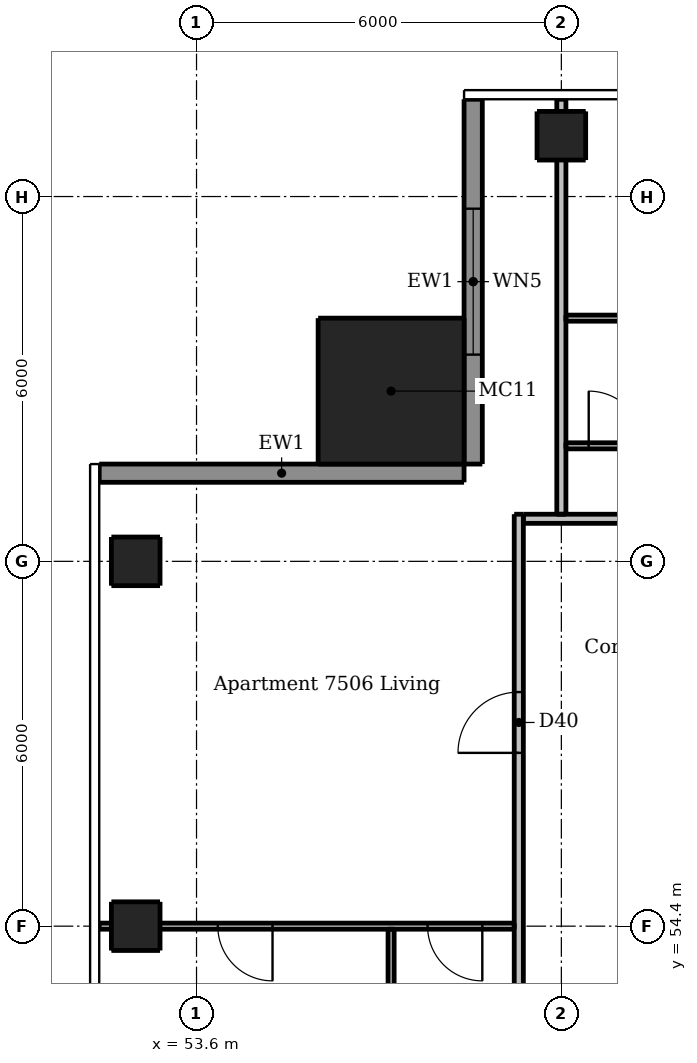
"""IFC4 building model, lengths in metres.
Left out: names, types, materials, properties, quantities, classifications, styles, units other than length and angle.
Written with IfcOpenShell. Run it as: python <this file> out.ifc"""

import sys

from ifc_helpers import new_model, si_unit, direction, frame, frame_2d, origin, origin_2d, place, context, subcontext, project, spatial, rectangle, extrude, element, fill, save


model = new_model("IFC4")
c1 = context("Model", 3, precision=1e-05, world=origin(), true_north=direction((0.0, 1.0)))
c2 = subcontext(c1, "Body", "Model", "MODEL_VIEW")
j1 = project(units=[si_unit("LENGTHUNIT", "METRE"), si_unit("PLANEANGLEUNIT", "RADIAN")], contexts=[c1])
p1 = place(None, origin())
s1 = spatial("IfcSite", under=j1, at=p1, CompositionType="ELEMENT")
p2 = place(p1, origin())
s2 = spatial("IfcBuilding", under=s1, at=p2, CompositionType="ELEMENT")
p3 = place(p2, frame((0.0, 0.0, 278.5)))
s3 = spatial("IfcBuildingStorey", under=s2, at=p3, CompositionType="ELEMENT", Elevation=278.5)
for number, where, z_axis, x_axis in (
    (1, (59.6, 67.4, 0.0), (0.0, 0.0, 1.0), (1.0, 0.0, 0.0)),
    (2, (52.6, 54.4, 0.0), (0.0, 0.0, 1.0), (1.0, 0.0, 0.0)),
    (3, (52.6, 60.4, 0.0), (0.0, 0.0, 1.0), (1.0, 0.0, 0.0)),
):
    element("IfcColumn", number, at=place(p3, frame(where, z_axis=z_axis, x_axis=x_axis)), inside=s3, PredefinedType="COLUMN", context=c2, shape_type="SweptSolid", body=[
        extrude(rectangle(XDim=0.8, YDim=0.8, at=origin_2d()), origin(), (0.0, 0.0, 1.0), 3.0),
    ])
p4 = place(p3, frame((56.8, 63.2, 0.0), z_axis=(0.0, 0.0, 1.0), x_axis=(1.0, 0.0, 0.0)))
e4 = element("IfcColumn", 4, at=p4, inside=s3, PredefinedType="COLUMN", context=c2, shape_type="SweptSolid", body=[
    extrude(rectangle(XDim=2.4, YDim=2.4, at=origin_2d()), origin(), (0.0, 0.0, 1.0), 3.3),
])
p5 = place(p3, frame((58.15, 68.0, 0.0), z_axis=(0.0, 0.0, 1.0), x_axis=(0.0, -1.0, 0.0)))
e5 = element("IfcWall", 5, at=p5, inside=s3, PredefinedType="SOLIDWALL", context=c2, shape_type="SweptSolid", body=[
    extrude(rectangle(XDim=6.0, YDim=0.3, at=frame_2d((3.0, 0.0))), origin(), (0.0, 0.0, 1.0), 3.0),
])
p6 = place(p5, frame((1.8, 0.0, 0.15)))
e6 = element("IfcOpeningElement", 6, at=p6, cuts=e5, PredefinedType="OPENING", context=c2, shape_type="SweptSolid", body=[
    extrude(rectangle(XDim=2.4, YDim=2.1, at=frame_2d((1.2, 1.05))), frame((0.0, 0.16, 0.0), z_axis=(0.0, -1.0, 0.0), x_axis=(1.0, 0.0, 0.0)), (0.0, 0.0, 1.0), 0.32),
])
p7 = place(p3, frame((58.0, 61.85, 0.0), z_axis=(0.0, 0.0, 1.0), x_axis=(-1.0, 0.0, 0.0)))
e7 = element("IfcWall", 7, at=p7, inside=s3, PredefinedType="SOLIDWALL", context=c2, shape_type="SweptSolid", body=[
    extrude(rectangle(XDim=6.0, YDim=0.3, at=frame_2d((3.0, 0.0))), origin(), (0.0, 0.0, 1.0), 3.0),
])
p8 = place(p3, frame((56.8, 54.35, 0.0), z_axis=(0.0, 0.0, 1.0), x_axis=(0.0, -1.0, 0.0)))
e8 = element("IfcWall", 8, at=p8, inside=s3, PredefinedType="PARTITIONING", context=c2, shape_type="SweptSolid", body=[
    extrude(rectangle(XDim=5.875, YDim=0.1, at=frame_2d((2.938, 0.0))), origin(), (0.0, 0.0, 1.0), 3.0),
])
p9 = place(p8, frame((3.75, 0.0, 0.0)))
e9 = element("IfcOpeningElement", 9, at=p9, cuts=e8, PredefinedType="OPENING", context=c2, shape_type="SweptSolid", body=[
    extrude(rectangle(XDim=0.8, YDim=2.1, at=frame_2d((0.4, 1.05))), frame((0.0, 0.06, 0.0), z_axis=(0.0, -1.0, 0.0), x_axis=(1.0, 0.0, 0.0)), (0.0, 0.0, 1.0), 0.12),
])
p10 = place(p3, frame((59.675, 64.4, 0.0), z_axis=(0.0, 0.0, 1.0), x_axis=(1.0, 0.0, 0.0)))
e10 = element("IfcWall", 10, at=p10, inside=s3, PredefinedType="PARTITIONING", context=c2, shape_type="SweptSolid", body=[
    extrude(rectangle(XDim=3.475, YDim=0.1, at=frame_2d((1.737, 0.0))), origin(), (0.0, 0.0, 1.0), 3.0),
])
p11 = place(p3, frame((59.675, 62.3, 0.0), z_axis=(0.0, 0.0, 1.0), x_axis=(1.0, 0.0, 0.0)))
e11 = element("IfcWall", 11, at=p11, inside=s3, PredefinedType="PARTITIONING", context=c2, shape_type="SweptSolid", body=[
    extrude(rectangle(XDim=17.85, YDim=0.1, at=frame_2d((8.925, 0.0))), origin(), (0.0, 0.0, 1.0), 3.0),
])
p12 = place(p11, frame((5.775, 0.0, 0.0)))
e12 = element("IfcOpeningElement", 12, at=p12, cuts=e11, PredefinedType="OPENING", context=c2, shape_type="SweptSolid", body=[
    extrude(rectangle(XDim=0.9, YDim=2.1, at=frame_2d((0.45, 1.05))), frame((0.0, 0.06, 0.0), z_axis=(0.0, -1.0, 0.0), x_axis=(1.0, 0.0, 0.0)), (0.0, 0.0, 1.0), 0.12),
])
p13 = place(p11, frame((9.975, 0.0, 0.0)))
e13 = element("IfcOpeningElement", 13, at=p13, cuts=e11, PredefinedType="OPENING", context=c2, shape_type="SweptSolid", body=[
    extrude(rectangle(XDim=0.9, YDim=2.1, at=frame_2d((0.45, 1.05))), frame((0.0, 0.06, 0.0), z_axis=(0.0, -1.0, 0.0), x_axis=(1.0, 0.0, 0.0)), (0.0, 0.0, 1.0), 0.12),
])
p14 = place(p11, frame((0.375, 0.0, 0.0)))
e14 = element("IfcOpeningElement", 14, at=p14, cuts=e11, PredefinedType="OPENING", context=c2, shape_type="SweptSolid", body=[
    extrude(rectangle(XDim=0.9, YDim=2.1, at=frame_2d((0.45, 1.05))), frame((0.0, 0.06, 0.0), z_axis=(0.0, -1.0, 0.0), x_axis=(1.0, 0.0, 0.0)), (0.0, 0.0, 1.0), 0.12),
])
p15 = place(p11, frame((2.225, 0.0, 0.0)))
e15 = element("IfcOpeningElement", 15, at=p15, cuts=e11, PredefinedType="OPENING", context=c2, shape_type="SweptSolid", body=[
    extrude(rectangle(XDim=0.8, YDim=2.1, at=frame_2d((0.4, 1.05))), frame((0.0, 0.06, 0.0), z_axis=(0.0, -1.0, 0.0), x_axis=(1.0, 0.0, 0.0)), (0.0, 0.0, 1.0), 0.12),
])
p16 = place(p11, frame((15.675, 0.0, 0.0)))
e16 = element("IfcOpeningElement", 16, at=p16, cuts=e11, PredefinedType="OPENING", context=c2, shape_type="SweptSolid", body=[
    extrude(rectangle(XDim=0.9, YDim=2.1, at=frame_2d((0.45, 1.05))), frame((0.0, 0.06, 0.0), z_axis=(0.0, -1.0, 0.0), x_axis=(1.0, 0.0, 0.0)), (0.0, 0.0, 1.0), 0.12),
])
p17 = place(p11, frame((12.725, 0.0, 0.0)))
e17 = element("IfcOpeningElement", 17, at=p17, cuts=e11, PredefinedType="OPENING", context=c2, shape_type="SweptSolid", body=[
    extrude(rectangle(XDim=0.8, YDim=2.1, at=frame_2d((0.4, 1.05))), frame((0.0, 0.06, 0.0), z_axis=(0.0, -1.0, 0.0), x_axis=(1.0, 0.0, 0.0)), (0.0, 0.0, 1.0), 0.12),
])
p18 = place(p3, frame((58.825, 54.4, 0.0), z_axis=(0.0, 0.0, 1.0), x_axis=(-1.0, 0.0, 0.0)))
e18 = element("IfcWall", 18, at=p18, inside=s3, PredefinedType="PARTITIONING", context=c2, shape_type="SweptSolid", body=[
    extrude(rectangle(XDim=6.825, YDim=0.1, at=frame_2d((3.413, 0.0))), origin(), (0.0, 0.0, 1.0), 2.466),
])
p19 = place(p18, frame((0.525, 0.0, 0.0)))
e19 = element("IfcOpeningElement", 19, at=p19, cuts=e18, PredefinedType="OPENING", context=c2, shape_type="SweptSolid", body=[
    extrude(rectangle(XDim=0.9, YDim=2.1, at=frame_2d((0.45, 1.05))), frame((0.0, 0.06, 0.0), z_axis=(0.0, -1.0, 0.0), x_axis=(1.0, 0.0, 0.0)), (0.0, 0.0, 1.0), 0.12),
])
p20 = place(p18, frame((3.975, 0.0, 0.0)))
e20 = element("IfcOpeningElement", 20, at=p20, cuts=e18, PredefinedType="OPENING", context=c2, shape_type="SweptSolid", body=[
    extrude(rectangle(XDim=0.9, YDim=2.1, at=frame_2d((0.45, 1.05))), frame((0.0, 0.06, 0.0), z_axis=(0.0, -1.0, 0.0), x_axis=(1.0, 0.0, 0.0)), (0.0, 0.0, 1.0), 0.12),
])
p21 = place(p3, frame((58.9, 30.325, 0.0), z_axis=(0.0, 0.0, 1.0), x_axis=(0.0, 1.0, 0.0)))
e21 = element("IfcWall", 21, at=p21, inside=s3, PredefinedType="PARTITIONING", context=c2, shape_type="SweptSolid", body=[
    extrude(rectangle(XDim=30.85, YDim=0.15, at=frame_2d((15.425, 0.0))), origin(), (0.0, 0.0, 1.0), 3.0),
])
p22 = place(p21, frame((9.225, 0.0, 0.0)))
e22 = element("IfcOpeningElement", 22, at=p22, cuts=e21, PredefinedType="OPENING", context=c2, shape_type="SweptSolid", body=[
    extrude(rectangle(XDim=1.0, YDim=2.1, at=frame_2d((0.5, 1.05))), frame((0.0, 0.085, 0.0), z_axis=(0.0, -1.0, 0.0), x_axis=(1.0, 0.0, 0.0)), (0.0, 0.0, 1.0), 0.17),
])
p23 = place(p21, frame((26.925, 0.0, 0.0)))
e23 = element("IfcOpeningElement", 23, at=p23, cuts=e21, PredefinedType="OPENING", context=c2, shape_type="SweptSolid", body=[
    extrude(rectangle(XDim=1.0, YDim=2.1, at=frame_2d((0.5, 1.05))), frame((0.0, 0.085, 0.0), z_axis=(0.0, -1.0, 0.0), x_axis=(1.0, 0.0, 0.0)), (0.0, 0.0, 1.0), 0.17),
])
p24 = place(p3, frame((59.6, 61.175, 0.0), z_axis=(0.0, 0.0, 1.0), x_axis=(0.0, 1.0, 0.0)))
e24 = element("IfcWall", 24, at=p24, inside=s3, PredefinedType="PARTITIONING", context=c2, shape_type="SweptSolid", body=[
    extrude(rectangle(XDim=6.825, YDim=0.15, at=frame_2d((3.413, 0.0))), origin(), (0.0, 0.0, 1.0), 2.46),
])
p25 = place(p3, frame((58.975, 61.1, 0.0), z_axis=(0.0, 0.0, 1.0), x_axis=(1.0, 0.0, 0.0)))
e25 = element("IfcWall", 25, at=p25, inside=s3, PredefinedType="PARTITIONING", context=c2, shape_type="SweptSolid", body=[
    extrude(rectangle(XDim=29.25, YDim=0.15, at=frame_2d((14.625, 0.0))), origin(), (0.0, 0.0, 1.0), 3.0),
])
p26 = place(p25, frame((9.125, 0.0, 0.0)))
e26 = element("IfcOpeningElement", 26, at=p26, cuts=e25, PredefinedType="OPENING", context=c2, shape_type="SweptSolid", body=[
    extrude(rectangle(XDim=1.0, YDim=2.1, at=frame_2d((0.5, 1.05))), frame((0.0, 0.085, 0.0), z_axis=(0.0, -1.0, 0.0), x_axis=(1.0, 0.0, 0.0)), (0.0, 0.0, 1.0), 0.17),
])
p27 = place(p25, frame((26.475, 0.0, 0.0)))
e27 = element("IfcOpeningElement", 27, at=p27, cuts=e25, PredefinedType="OPENING", context=c2, shape_type="SweptSolid", body=[
    extrude(rectangle(XDim=1.0, YDim=2.1, at=frame_2d((0.5, 1.05))), frame((0.0, 0.085, 0.0), z_axis=(0.0, -1.0, 0.0), x_axis=(1.0, 0.0, 0.0)), (0.0, 0.0, 1.0), 0.17),
])
p28 = place(p6, origin())
e28 = element("IfcWindow", 28, at=p28, inside=s3, PartitioningType="DOUBLE_PANEL_VERTICAL", PredefinedType="WINDOW", context=c2, shape_type="SweptSolid", body=[
    extrude(rectangle(XDim=2.4, YDim=2.1, at=frame_2d((1.2, 1.05))), frame((0.0, 0.03, 0.0), z_axis=(0.0, -1.0, 0.0), x_axis=(1.0, 0.0, 0.0)), (0.0, 0.0, 1.0), 0.06),
])
fill(e6, e28)
p29 = place(p14, origin())
e29 = element("IfcDoor", 29, at=p29, inside=s3, OperationType="SINGLE_SWING_LEFT", PredefinedType="DOOR", context=c2, shape_type="SweptSolid", body=[
    extrude(rectangle(XDim=0.9, YDim=2.1, at=frame_2d((0.45, 1.05))), frame((0.0, 0.025, 0.0), z_axis=(0.0, -1.0, 0.0), x_axis=(1.0, 0.0, 0.0)), (0.0, 0.0, 1.0), 0.05),
])
fill(e14, e29)
p30 = place(p23, origin())
e30 = element("IfcDoor", 30, at=p30, inside=s3, OperationType="SINGLE_SWING_LEFT", PredefinedType="DOOR", context=c2, shape_type="SweptSolid", body=[
    extrude(rectangle(XDim=1.0, YDim=2.1, at=frame_2d((0.5, 1.05))), frame((0.0, 0.025, 0.0), z_axis=(0.0, -1.0, 0.0), x_axis=(1.0, 0.0, 0.0)), (0.0, 0.0, 1.0), 0.05),
])
fill(e23, e30)
p31 = place(p19, origin())
e31 = element("IfcDoor", 31, at=p31, inside=s3, OperationType="SINGLE_SWING_LEFT", PredefinedType="DOOR", context=c2, shape_type="SweptSolid", body=[
    extrude(rectangle(XDim=0.9, YDim=2.1, at=frame_2d((0.45, 1.05))), frame((0.0, 0.025, 0.0), z_axis=(0.0, -1.0, 0.0), x_axis=(1.0, 0.0, 0.0)), (0.0, 0.0, 1.0), 0.05),
])
fill(e19, e31)
p32 = place(p20, origin())
e32 = element("IfcDoor", 32, at=p32, inside=s3, OperationType="SINGLE_SWING_LEFT", PredefinedType="DOOR", context=c2, shape_type="SweptSolid", body=[
    extrude(rectangle(XDim=0.9, YDim=2.1, at=frame_2d((0.45, 1.05))), frame((0.0, 0.025, 0.0), z_axis=(0.0, -1.0, 0.0), x_axis=(1.0, 0.0, 0.0)), (0.0, 0.0, 1.0), 0.05),
])
fill(e20, e32)
save(model, sys.argv[1])
